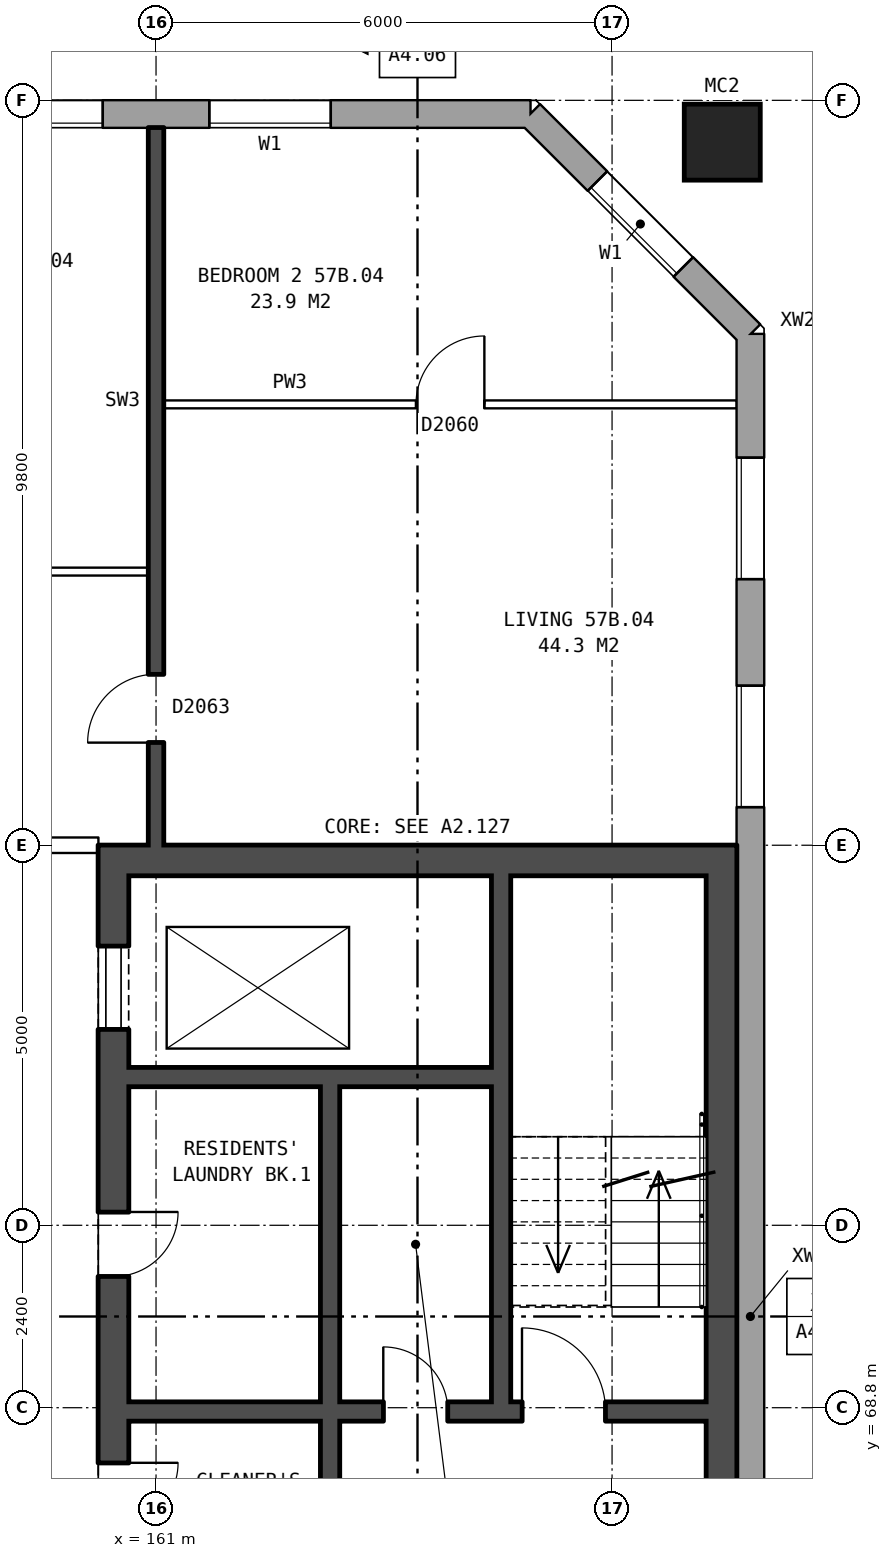
"""IFC4 building model, lengths in metres.
Left out: names, types, materials, properties, quantities, classifications, styles, units other than length and angle.
Written with IfcOpenShell. Run it as: python <this file> out.ifc"""

import sys

from ifc_helpers import new_model, si_unit, direction, frame, frame_2d, origin, origin_2d, place, context, subcontext, project, spatial, rectangle, hollow_rectangle, extrude, element, fill, save


model = new_model("IFC4")
c1 = context("Model", 3, precision=1e-05, world=origin(), true_north=direction((0.0, 1.0)))
c2 = subcontext(c1, "Body", "Model", "MODEL_VIEW")
j1 = project(units=[si_unit("LENGTHUNIT", "METRE"), si_unit("PLANEANGLEUNIT", "RADIAN")], contexts=[c1])
p1 = place(None, origin())
s1 = spatial("IfcSite", under=j1, at=p1, CompositionType="ELEMENT")
p2 = place(p1, origin())
s2 = spatial("IfcBuilding", under=s1, at=p2, CompositionType="ELEMENT")
p3 = place(p2, frame((0.0, 0.0, 202.8)))
s3 = spatial("IfcBuildingStorey", under=s2, at=p3, CompositionType="ELEMENT", Elevation=202.8)
p4 = place(p3, frame((168.45, 85.45, 0.0), z_axis=(0.0, 0.0, 1.0), x_axis=(1.0, 0.0, 0.0)))
e1 = element("IfcColumn", 1, at=p4, inside=s3, PredefinedType="COLUMN", context=c2, shape_type="SweptSolid", body=[
    extrude(hollow_rectangle(XDim=1.0, YDim=1.0, WallThickness=0.055, at=origin_2d()), origin(), (0.0, 0.0, 1.0), 3.1),
])
p5 = place(p3, frame((168.82, 57.075, 0.0), z_axis=(0.0, 0.0, 1.0), x_axis=(0.0, 1.0, 0.0)))
e2 = element("IfcWall", 2, at=p5, inside=s3, PredefinedType="STANDARD", context=c2, shape_type="SweptSolid", body=[
    extrude(rectangle(XDim=25.851, YDim=0.36, at=frame_2d((12.925, 0.0))), origin(), (0.0, 0.0, 1.0), 2.85),
])
p6 = place(p5, frame((1.625, 0.0, 0.8)))
e3 = element("IfcOpeningElement", 3, at=p6, cuts=e2, PredefinedType="OPENING", context=c2, shape_type="SweptSolid", body=[
    extrude(rectangle(XDim=1.6, YDim=1.8, at=frame_2d((0.8, 0.9))), frame((0.0, 0.19, 0.0), z_axis=(0.0, -1.0, 0.0), x_axis=(1.0, 0.0, 0.0)), (0.0, 0.0, 1.0), 0.38),
])
p7 = place(p5, frame((4.625, 0.0, 0.8)))
e4 = element("IfcOpeningElement", 4, at=p7, cuts=e2, PredefinedType="OPENING", context=c2, shape_type="SweptSolid", body=[
    extrude(rectangle(XDim=1.6, YDim=1.8, at=frame_2d((0.8, 0.9))), frame((0.0, 0.19, 0.0), z_axis=(0.0, -1.0, 0.0), x_axis=(1.0, 0.0, 0.0)), (0.0, 0.0, 1.0), 0.38),
])
p8 = place(p5, frame((19.625, 0.0, 0.8)))
e5 = element("IfcOpeningElement", 5, at=p8, cuts=e2, PredefinedType="OPENING", context=c2, shape_type="SweptSolid", body=[
    extrude(rectangle(XDim=1.6, YDim=1.8, at=frame_2d((0.8, 0.9))), frame((0.0, 0.19, 0.0), z_axis=(0.0, -1.0, 0.0), x_axis=(1.0, 0.0, 0.0)), (0.0, 0.0, 1.0), 0.38),
])
p9 = place(p5, frame((22.625, 0.0, 0.8)))
e6 = element("IfcOpeningElement", 6, at=p9, cuts=e2, PredefinedType="OPENING", context=c2, shape_type="SweptSolid", body=[
    extrude(rectangle(XDim=1.6, YDim=1.8, at=frame_2d((0.8, 0.9))), frame((0.0, 0.19, 0.0), z_axis=(0.0, -1.0, 0.0), x_axis=(1.0, 0.0, 0.0)), (0.0, 0.0, 1.0), 0.38),
])
p10 = place(p3, frame((168.82, 82.925, 0.0), z_axis=(0.0, 0.0, 1.0), x_axis=(-0.707106781187, 0.707106781187, 0.0)))
e7 = element("IfcWall", 7, at=p10, inside=s3, PredefinedType="STANDARD", context=c2, shape_type="SweptSolid", body=[
    extrude(rectangle(XDim=4.094, YDim=0.36, at=frame_2d((2.047, 0.0))), origin(), (0.0, 0.0, 1.0), 2.85),
])
p11 = place(p10, frame((1.247, 0.0, 0.8)))
e8 = element("IfcOpeningElement", 8, at=p11, cuts=e7, PredefinedType="OPENING", context=c2, shape_type="SweptSolid", body=[
    extrude(rectangle(XDim=1.6, YDim=1.8, at=frame_2d((0.8, 0.9))), frame((0.0, 0.19, 0.0), z_axis=(0.0, -1.0, 0.0), x_axis=(1.0, 0.0, 0.0)), (0.0, 0.0, 1.0), 0.38),
])
p12 = place(p3, frame((165.925, 85.82, 0.0), z_axis=(0.0, 0.0, 1.0), x_axis=(-1.0, 0.0, 0.0)))
e9 = element("IfcWall", 9, at=p12, inside=s3, PredefinedType="STANDARD", context=c2, shape_type="SweptSolid", body=[
    extrude(rectangle(XDim=33.875, YDim=0.36, at=frame_2d((16.938, 0.0))), origin(), (0.0, 0.0, 1.0), 2.85),
])
p13 = place(p12, frame((2.625, 0.0, 0.8)))
e10 = element("IfcOpeningElement", 10, at=p13, cuts=e9, PredefinedType="OPENING", context=c2, shape_type="SweptSolid", body=[
    extrude(rectangle(XDim=1.6, YDim=1.8, at=frame_2d((0.8, 0.9))), frame((0.0, 0.19, 0.0), z_axis=(0.0, -1.0, 0.0), x_axis=(1.0, 0.0, 0.0)), (0.0, 0.0, 1.0), 0.38),
])
p14 = place(p12, frame((5.625, 0.0, 0.8)))
e11 = element("IfcOpeningElement", 11, at=p14, cuts=e9, PredefinedType="OPENING", context=c2, shape_type="SweptSolid", body=[
    extrude(rectangle(XDim=1.6, YDim=1.8, at=frame_2d((0.8, 0.9))), frame((0.0, 0.19, 0.0), z_axis=(0.0, -1.0, 0.0), x_axis=(1.0, 0.0, 0.0)), (0.0, 0.0, 1.0), 0.38),
])
p15 = place(p12, frame((8.625, 0.0, 0.8)))
e12 = element("IfcOpeningElement", 12, at=p15, cuts=e9, PredefinedType="OPENING", context=c2, shape_type="SweptSolid", body=[
    extrude(rectangle(XDim=1.6, YDim=1.8, at=frame_2d((0.8, 0.9))), frame((0.0, 0.19, 0.0), z_axis=(0.0, -1.0, 0.0), x_axis=(1.0, 0.0, 0.0)), (0.0, 0.0, 1.0), 0.38),
])
p16 = place(p12, frame((11.625, 0.0, 0.8)))
e13 = element("IfcOpeningElement", 13, at=p16, cuts=e9, PredefinedType="OPENING", context=c2, shape_type="SweptSolid", body=[
    extrude(rectangle(XDim=1.6, YDim=1.8, at=frame_2d((0.8, 0.9))), frame((0.0, 0.19, 0.0), z_axis=(0.0, -1.0, 0.0), x_axis=(1.0, 0.0, 0.0)), (0.0, 0.0, 1.0), 0.38),
])
p17 = place(p12, frame((14.625, 0.0, 0.8)))
e14 = element("IfcOpeningElement", 14, at=p17, cuts=e9, PredefinedType="OPENING", context=c2, shape_type="SweptSolid", body=[
    extrude(rectangle(XDim=1.6, YDim=1.8, at=frame_2d((0.8, 0.9))), frame((0.0, 0.19, 0.0), z_axis=(0.0, -1.0, 0.0), x_axis=(1.0, 0.0, 0.0)), (0.0, 0.0, 1.0), 0.38),
])
p18 = place(p12, frame((17.625, 0.0, 0.8)))
e15 = element("IfcOpeningElement", 15, at=p18, cuts=e9, PredefinedType="OPENING", context=c2, shape_type="SweptSolid", body=[
    extrude(rectangle(XDim=1.6, YDim=1.8, at=frame_2d((0.8, 0.9))), frame((0.0, 0.19, 0.0), z_axis=(0.0, -1.0, 0.0), x_axis=(1.0, 0.0, 0.0)), (0.0, 0.0, 1.0), 0.38),
])
p19 = place(p12, frame((20.625, 0.0, 0.8)))
e16 = element("IfcOpeningElement", 16, at=p19, cuts=e9, PredefinedType="OPENING", context=c2, shape_type="SweptSolid", body=[
    extrude(rectangle(XDim=1.6, YDim=1.8, at=frame_2d((0.8, 0.9))), frame((0.0, 0.19, 0.0), z_axis=(0.0, -1.0, 0.0), x_axis=(1.0, 0.0, 0.0)), (0.0, 0.0, 1.0), 0.38),
])
p20 = place(p12, frame((23.625, 0.0, 0.8)))
e17 = element("IfcOpeningElement", 17, at=p20, cuts=e9, PredefinedType="OPENING", context=c2, shape_type="SweptSolid", body=[
    extrude(rectangle(XDim=1.6, YDim=1.8, at=frame_2d((0.8, 0.9))), frame((0.0, 0.19, 0.0), z_axis=(0.0, -1.0, 0.0), x_axis=(1.0, 0.0, 0.0)), (0.0, 0.0, 1.0), 0.38),
])
p21 = place(p12, frame((26.625, 0.0, 0.8)))
e18 = element("IfcOpeningElement", 18, at=p21, cuts=e9, PredefinedType="OPENING", context=c2, shape_type="SweptSolid", body=[
    extrude(rectangle(XDim=1.6, YDim=1.8, at=frame_2d((0.8, 0.9))), frame((0.0, 0.19, 0.0), z_axis=(0.0, -1.0, 0.0), x_axis=(1.0, 0.0, 0.0)), (0.0, 0.0, 1.0), 0.38),
])
p22 = place(p12, frame((29.625, 0.0, 0.8)))
e19 = element("IfcOpeningElement", 19, at=p22, cuts=e9, PredefinedType="OPENING", context=c2, shape_type="SweptSolid", body=[
    extrude(rectangle(XDim=1.6, YDim=1.8, at=frame_2d((0.8, 0.9))), frame((0.0, 0.19, 0.0), z_axis=(0.0, -1.0, 0.0), x_axis=(1.0, 0.0, 0.0)), (0.0, 0.0, 1.0), 0.38),
])
p23 = place(p3, frame((160.44, 76.2, 0.0), z_axis=(0.0, 0.0, 1.0), x_axis=(0.0, -1.0, 0.0)))
e20 = element("IfcWall", 20, at=p23, inside=s3, PredefinedType="SHEAR", context=c2, shape_type="SweptSolid", body=[
    extrude(rectangle(XDim=12.4, YDim=0.4, at=frame_2d((6.2, 0.0))), origin(), (0.0, 0.0, 1.0), 2.85),
])
p24 = place(p23, frame((1.325, 0.0, 0.0)))
e21 = element("IfcOpeningElement", 21, at=p24, cuts=e20, PredefinedType="OPENING", context=c2, shape_type="SweptSolid", body=[
    extrude(rectangle(XDim=1.1, YDim=2.1, at=frame_2d((0.55, 1.05))), frame((0.0, 0.21, 0.0), z_axis=(0.0, -1.0, 0.0), x_axis=(1.0, 0.0, 0.0)), (0.0, 0.0, 1.0), 0.42),
])
p25 = place(p23, frame((4.825, 0.0, 0.0)))
e22 = element("IfcOpeningElement", 22, at=p25, cuts=e20, PredefinedType="OPENING", context=c2, shape_type="SweptSolid", body=[
    extrude(rectangle(XDim=0.85, YDim=2.1, at=frame_2d((0.425, 1.05))), frame((0.0, 0.21, 0.0), z_axis=(0.0, -1.0, 0.0), x_axis=(1.0, 0.0, 0.0)), (0.0, 0.0, 1.0), 0.42),
])
p26 = place(p23, frame((9.9, 0.0, 0.0)))
e23 = element("IfcOpeningElement", 23, at=p26, cuts=e20, PredefinedType="OPENING", context=c2, shape_type="SweptSolid", body=[
    extrude(rectangle(XDim=1.1, YDim=2.1, at=frame_2d((0.55, 1.05))), frame((0.0, 0.21, 0.0), z_axis=(0.0, -1.0, 0.0), x_axis=(1.0, 0.0, 0.0)), (0.0, 0.0, 1.0), 0.42),
])
p27 = place(p23, frame((8.125, 0.0, 0.0)))
e24 = element("IfcOpeningElement", 24, at=p27, cuts=e20, PredefinedType="OPENING", context=c2, shape_type="SweptSolid", body=[
    extrude(rectangle(XDim=0.85, YDim=2.1, at=frame_2d((0.425, 1.05))), frame((0.0, 0.21, 0.0), z_axis=(0.0, -1.0, 0.0), x_axis=(1.0, 0.0, 0.0)), (0.0, 0.0, 1.0), 0.42),
])
p28 = place(p3, frame((168.44, 76.2, 0.0), z_axis=(0.0, 0.0, 1.0), x_axis=(0.0, -1.0, 0.0)))
e25 = element("IfcWall", 25, at=p28, inside=s3, PredefinedType="SHEAR", context=c2, shape_type="SweptSolid", body=[
    extrude(rectangle(XDim=12.4, YDim=0.4, at=frame_2d((6.2, 0.0))), origin(), (0.0, 0.0, 1.0), 2.85),
])
p29 = place(p3, frame((160.64, 76.0, 0.0), z_axis=(0.0, 0.0, 1.0), x_axis=(1.0, 0.0, 0.0)))
e26 = element("IfcWall", 26, at=p29, inside=s3, PredefinedType="SHEAR", context=c2, shape_type="SweptSolid", body=[
    extrude(rectangle(XDim=7.6, YDim=0.4, at=frame_2d((3.8, 0.0))), origin(), (0.0, 0.0, 1.0), 2.85),
])
p30 = place(p3, frame((160.64, 73.15, 0.0), z_axis=(0.0, 0.0, 1.0), x_axis=(1.0, 0.0, 0.0)))
e27 = element("IfcWall", 27, at=p30, inside=s3, PredefinedType="SHEAR", context=c2, shape_type="SweptSolid", body=[
    extrude(rectangle(XDim=4.775, YDim=0.25, at=frame_2d((2.388, 0.0))), origin(), (0.0, 0.0, 1.0), 2.85),
])
p31 = place(p3, frame((160.64, 68.75, 0.0), z_axis=(0.0, 0.0, 1.0), x_axis=(1.0, 0.0, 0.0)))
e28 = element("IfcWall", 28, at=p31, inside=s3, PredefinedType="SHEAR", context=c2, shape_type="SweptSolid", body=[
    extrude(rectangle(XDim=7.6, YDim=0.25, at=frame_2d((3.8, 0.0))), origin(), (0.0, 0.0, 1.0), 2.85),
])
p32 = place(p31, frame((5.175, 0.0, 0.0)))
e29 = element("IfcOpeningElement", 29, at=p32, cuts=e28, PredefinedType="OPENING", context=c2, shape_type="SweptSolid", body=[
    extrude(rectangle(XDim=1.1, YDim=2.1, at=frame_2d((0.55, 1.05))), frame((0.0, 0.135, 0.0), z_axis=(0.0, -1.0, 0.0), x_axis=(1.0, 0.0, 0.0)), (0.0, 0.0, 1.0), 0.27),
])
p33 = place(p31, frame((3.35, 0.0, 0.0)))
e30 = element("IfcOpeningElement", 30, at=p33, cuts=e28, PredefinedType="OPENING", context=c2, shape_type="SweptSolid", body=[
    extrude(rectangle(XDim=0.85, YDim=2.1, at=frame_2d((0.425, 1.05))), frame((0.0, 0.135, 0.0), z_axis=(0.0, -1.0, 0.0), x_axis=(1.0, 0.0, 0.0)), (0.0, 0.0, 1.0), 0.27),
])
p34 = place(p3, frame((163.29, 73.025, 0.0), z_axis=(0.0, 0.0, 1.0), x_axis=(0.0, -1.0, 0.0)))
e31 = element("IfcWall", 31, at=p34, inside=s3, PredefinedType="SHEAR", context=c2, shape_type="SweptSolid", body=[
    extrude(rectangle(XDim=4.15, YDim=0.25, at=frame_2d((2.075, 0.0))), origin(), (0.0, 0.0, 1.0), 2.85),
])
p35 = place(p3, frame((163.29, 68.625, 0.0), z_axis=(0.0, 0.0, 1.0), x_axis=(0.0, -1.0, 0.0)))
e32 = element("IfcWall", 32, at=p35, inside=s3, PredefinedType="SHEAR", context=c2, shape_type="SweptSolid", body=[
    extrude(rectangle(XDim=2.2, YDim=0.25, at=frame_2d((1.1, 0.0))), origin(), (0.0, 0.0, 1.0), 2.85),
])
p36 = place(p3, frame((165.54, 75.8, 0.0), z_axis=(0.0, 0.0, 1.0), x_axis=(0.0, -1.0, 0.0)))
e33 = element("IfcWall", 33, at=p36, inside=s3, PredefinedType="SHEAR", context=c2, shape_type="SweptSolid", body=[
    extrude(rectangle(XDim=6.925, YDim=0.25, at=frame_2d((3.462, 0.0))), origin(), (0.0, 0.0, 1.0), 2.85),
])
p37 = place(p3, frame((157.24, 76.2, 0.0), z_axis=(0.0, 0.0, 1.0), x_axis=(1.0, 0.0, 0.0)))
e34 = element("IfcWall", 34, at=p37, inside=s3, PredefinedType="PARTITIONING", context=c2, shape_type="SweptSolid", body=[
    extrude(rectangle(XDim=3.0, YDim=0.2, at=frame_2d((1.5, 0.0))), origin(), (0.0, 0.0, 1.0), 2.85),
])
p38 = place(p37, frame((1.0, 0.0, 0.0)))
e35 = element("IfcOpeningElement", 35, at=p38, cuts=e34, PredefinedType="OPENING", context=c2, shape_type="SweptSolid", body=[
    extrude(rectangle(XDim=1.0, YDim=2.1, at=frame_2d((0.5, 1.05))), frame((0.0, 0.11, 0.0), z_axis=(0.0, -1.0, 0.0), x_axis=(1.0, 0.0, 0.0)), (0.0, 0.0, 1.0), 0.22),
])
p39 = place(p3, frame((155.1, 79.8, 0.0), z_axis=(0.0, 0.0, 1.0), x_axis=(1.0, 0.0, 0.0)))
e36 = element("IfcWall", 36, at=p39, inside=s3, PredefinedType="PARTITIONING", context=c2, shape_type="SweptSolid", body=[
    extrude(rectangle(XDim=5.8, YDim=0.1, at=frame_2d((2.9, 0.0))), origin(), (0.0, 0.0, 1.0), 2.85),
])
p40 = place(p39, frame((3.6, 0.0, 0.0)))
e37 = element("IfcOpeningElement", 37, at=p40, cuts=e36, PredefinedType="OPENING", context=c2, shape_type="SweptSolid", body=[
    extrude(rectangle(XDim=0.9, YDim=2.1, at=frame_2d((0.45, 1.05))), frame((0.0, 0.06, 0.0), z_axis=(0.0, -1.0, 0.0), x_axis=(1.0, 0.0, 0.0)), (0.0, 0.0, 1.0), 0.12),
])
p41 = place(p39, frame((0.7, 0.0, 0.0)))
e38 = element("IfcOpeningElement", 38, at=p41, cuts=e36, PredefinedType="OPENING", context=c2, shape_type="SweptSolid", body=[
    extrude(rectangle(XDim=0.9, YDim=2.1, at=frame_2d((0.45, 1.05))), frame((0.0, 0.06, 0.0), z_axis=(0.0, -1.0, 0.0), x_axis=(1.0, 0.0, 0.0)), (0.0, 0.0, 1.0), 0.12),
])
p42 = place(p3, frame((161.1, 82.0, 0.0), z_axis=(0.0, 0.0, 1.0), x_axis=(1.0, 0.0, 0.0)))
e39 = element("IfcWall", 39, at=p42, inside=s3, PredefinedType="PARTITIONING", context=c2, shape_type="SweptSolid", body=[
    extrude(rectangle(XDim=7.54, YDim=0.1, at=frame_2d((3.77, 0.0))), origin(), (0.0, 0.0, 1.0), 2.85),
])
p43 = place(p42, frame((3.32, 0.0, 0.0)))
e40 = element("IfcOpeningElement", 40, at=p43, cuts=e39, PredefinedType="OPENING", context=c2, shape_type="SweptSolid", body=[
    extrude(rectangle(XDim=0.9, YDim=2.1, at=frame_2d((0.45, 1.05))), frame((0.0, 0.06, 0.0), z_axis=(0.0, -1.0, 0.0), x_axis=(1.0, 0.0, 0.0)), (0.0, 0.0, 1.0), 0.12),
])
p44 = place(p3, frame((161.0, 76.2, 0.0), z_axis=(0.0, 0.0, 1.0), x_axis=(0.0, 1.0, 0.0)))
e41 = element("IfcWall", 41, at=p44, inside=s3, PredefinedType="SOLIDWALL", context=c2, shape_type="SweptSolid", body=[
    extrude(rectangle(XDim=9.44, YDim=0.2, at=frame_2d((4.72, 0.0))), origin(), (0.0, 0.0, 1.0), 2.85),
])
p45 = place(p44, frame((1.35, 0.0, 0.0)))
e42 = element("IfcOpeningElement", 42, at=p45, cuts=e41, PredefinedType="OPENING", context=c2, shape_type="SweptSolid", body=[
    extrude(rectangle(XDim=0.9, YDim=2.1, at=frame_2d((0.45, 1.05))), frame((0.0, 0.11, 0.0), z_axis=(0.0, -1.0, 0.0), x_axis=(1.0, 0.0, 0.0)), (0.0, 0.0, 1.0), 0.22),
])
p46 = place(p8, origin())
e43 = element("IfcWindow", 43, at=p46, inside=s3, PartitioningType="SINGLE_PANEL", PredefinedType="WINDOW", context=c2, shape_type="SweptSolid", body=[
    extrude(rectangle(XDim=1.6, YDim=1.8, at=frame_2d((0.8, 0.9))), frame((0.0, 0.15, 0.0), z_axis=(0.0, -1.0, 0.0), x_axis=(1.0, 0.0, 0.0)), (0.0, 0.0, 1.0), 0.06),
])
fill(e5, e43)
p47 = place(p9, origin())
e44 = element("IfcWindow", 44, at=p47, inside=s3, PartitioningType="SINGLE_PANEL", PredefinedType="WINDOW", context=c2, shape_type="SweptSolid", body=[
    extrude(rectangle(XDim=1.6, YDim=1.8, at=frame_2d((0.8, 0.9))), frame((0.0, 0.15, 0.0), z_axis=(0.0, -1.0, 0.0), x_axis=(1.0, 0.0, 0.0)), (0.0, 0.0, 1.0), 0.06),
])
fill(e6, e44)
p48 = place(p11, origin())
e45 = element("IfcWindow", 45, at=p48, inside=s3, PartitioningType="SINGLE_PANEL", PredefinedType="WINDOW", context=c2, shape_type="SweptSolid", body=[
    extrude(rectangle(XDim=1.6, YDim=1.8, at=frame_2d((0.8, 0.9))), frame((0.0, 0.15, 0.0), z_axis=(0.0, -1.0, 0.0), x_axis=(1.0, 0.0, 0.0)), (0.0, 0.0, 1.0), 0.06),
])
fill(e8, e45)
p49 = place(p13, origin())
e46 = element("IfcWindow", 46, at=p49, inside=s3, PartitioningType="SINGLE_PANEL", PredefinedType="WINDOW", context=c2, shape_type="SweptSolid", body=[
    extrude(rectangle(XDim=1.6, YDim=1.8, at=frame_2d((0.8, 0.9))), frame((0.0, 0.15, 0.0), z_axis=(0.0, -1.0, 0.0), x_axis=(1.0, 0.0, 0.0)), (0.0, 0.0, 1.0), 0.06),
])
fill(e10, e46)
p50 = place(p14, origin())
e47 = element("IfcWindow", 47, at=p50, inside=s3, PartitioningType="SINGLE_PANEL", PredefinedType="WINDOW", context=c2, shape_type="SweptSolid", body=[
    extrude(rectangle(XDim=1.6, YDim=1.8, at=frame_2d((0.8, 0.9))), frame((0.0, 0.15, 0.0), z_axis=(0.0, -1.0, 0.0), x_axis=(1.0, 0.0, 0.0)), (0.0, 0.0, 1.0), 0.06),
])
fill(e11, e47)
p51 = place(p24, origin())
e48 = element("IfcDoor", 48, at=p51, inside=s3, OperationType="DOUBLE_DOOR_SLIDING", PredefinedType="DOOR", context=c2, shape_type="SweptSolid", body=[
    extrude(rectangle(XDim=1.1, YDim=2.1, at=frame_2d((0.55, 1.05))), frame((0.0, 0.185, 0.0), z_axis=(0.0, -1.0, 0.0), x_axis=(1.0, 0.0, 0.0)), (0.0, 0.0, 1.0), 0.05),
])
fill(e21, e48)
p52 = place(p25, origin())
e49 = element("IfcDoor", 49, at=p52, inside=s3, OperationType="SINGLE_SWING_LEFT", PredefinedType="DOOR", context=c2, shape_type="SweptSolid", body=[
    extrude(rectangle(XDim=0.85, YDim=2.1, at=frame_2d((0.425, 1.05))), frame((0.0, 0.185, 0.0), z_axis=(0.0, -1.0, 0.0), x_axis=(1.0, 0.0, 0.0)), (0.0, 0.0, 1.0), 0.05),
])
fill(e22, e49)
p53 = place(p32, origin())
e50 = element("IfcDoor", 50, at=p53, inside=s3, OperationType="SINGLE_SWING_LEFT", PredefinedType="DOOR", context=c2, shape_type="SweptSolid", body=[
    extrude(rectangle(XDim=1.1, YDim=2.1, at=frame_2d((0.55, 1.05))), frame((0.0, 0.025, 0.0), z_axis=(0.0, -1.0, 0.0), x_axis=(1.0, 0.0, 0.0)), (0.0, 0.0, 1.0), 0.05),
])
fill(e29, e50)
p54 = place(p27, origin())
e51 = element("IfcDoor", 51, at=p54, inside=s3, OperationType="SINGLE_SWING_LEFT", PredefinedType="DOOR", context=c2, shape_type="SweptSolid", body=[
    extrude(rectangle(XDim=0.85, YDim=2.1, at=frame_2d((0.425, 1.05))), frame((0.0, 0.185, 0.0), z_axis=(0.0, -1.0, 0.0), x_axis=(1.0, 0.0, 0.0)), (0.0, 0.0, 1.0), 0.05),
])
fill(e24, e51)
p55 = place(p33, origin())
e52 = element("IfcDoor", 52, at=p55, inside=s3, OperationType="SINGLE_SWING_LEFT", PredefinedType="DOOR", context=c2, shape_type="SweptSolid", body=[
    extrude(rectangle(XDim=0.85, YDim=2.1, at=frame_2d((0.425, 1.05))), frame((0.0, 0.025, 0.0), z_axis=(0.0, -1.0, 0.0), x_axis=(1.0, 0.0, 0.0)), (0.0, 0.0, 1.0), 0.05),
])
fill(e30, e52)
p56 = place(p43, origin())
e53 = element("IfcDoor", 53, at=p56, inside=s3, OperationType="SINGLE_SWING_RIGHT", PredefinedType="DOOR", context=c2, shape_type="SweptSolid", body=[
    extrude(rectangle(XDim=0.9, YDim=2.1, at=frame_2d((0.45, 1.05))), frame((0.0, 0.025, 0.0), z_axis=(0.0, -1.0, 0.0), x_axis=(1.0, 0.0, 0.0)), (0.0, 0.0, 1.0), 0.05),
])
fill(e40, e53)
p57 = place(p45, origin())
e54 = element("IfcDoor", 54, at=p57, inside=s3, OperationType="SINGLE_SWING_LEFT", PredefinedType="DOOR", context=c2, shape_type="SweptSolid", body=[
    extrude(rectangle(XDim=0.9, YDim=2.1, at=frame_2d((0.45, 1.05))), frame((0.0, 0.025, 0.0), z_axis=(0.0, -1.0, 0.0), x_axis=(1.0, 0.0, 0.0)), (0.0, 0.0, 1.0), 0.05),
])
fill(e42, e54)
save(model, sys.argv[1])
